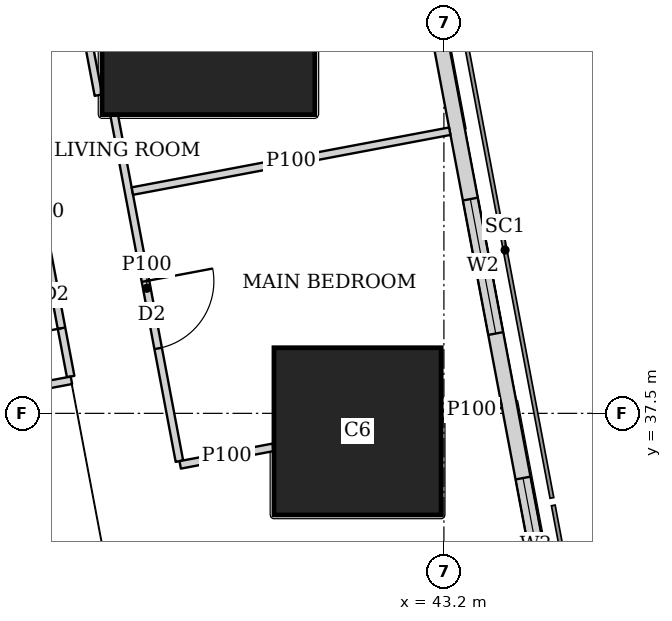
"""IFC4 building model, lengths in metres.
Left out: names, types, materials, properties, quantities, classifications, styles, units other than length and angle.
Written with IfcOpenShell. Run it as: python <this file> out.ifc"""

import sys

from ifc_helpers import new_model, si_unit, direction, frame, frame_2d, origin, origin_2d, place, context, subcontext, project, spatial, rectangle, extrude, element, fill, save


model = new_model("IFC4")
c1 = context("Model", 3, precision=1e-05, world=origin(), true_north=direction((0.0, 1.0)))
c2 = subcontext(c1, "Body", "Model", "MODEL_VIEW")
j1 = project(units=[si_unit("LENGTHUNIT", "METRE"), si_unit("PLANEANGLEUNIT", "RADIAN")], contexts=[c1])
p1 = place(None, origin())
s1 = spatial("IfcSite", under=j1, at=p1, CompositionType="ELEMENT")
p2 = place(p1, origin())
s2 = spatial("IfcBuilding", under=s1, at=p2, CompositionType="ELEMENT")
p3 = place(p2, frame((0.0, 0.0, 100.4)))
s3 = spatial("IfcBuildingStorey", under=s2, at=p3, CompositionType="ELEMENT", Elevation=100.4)
p4 = place(p3, frame((42.064, 37.263, 0.0), z_axis=(0.0, 0.0, 1.0), x_axis=(1.0, 0.0, 0.0)))
e1 = element("IfcColumn", 1, at=p4, inside=s3, PredefinedType="COLUMN", context=c2, shape_type="SweptSolid", body=[
    extrude(rectangle(XDim=2.2, YDim=2.2, at=origin_2d()), origin(), (0.0, 0.0, 1.0), 3.75),
])
p5 = place(p3, frame((40.102, 42.83, 0.0), z_axis=(0.0, 0.0, 1.0), x_axis=(1.0, 0.0, 0.0)))
e2 = element("IfcColumn", 2, at=p5, inside=s3, PredefinedType="COLUMN", context=c2, shape_type="SweptSolid", body=[
    extrude(rectangle(XDim=2.8, YDim=2.8, at=origin_2d()), origin(), (0.0, 0.0, 1.0), 3.75),
])
p6 = place(p3, frame((50.653, 2.703, 0.0), z_axis=(0.0, 0.0, 1.0), x_axis=(-0.185612026696, 0.982623109613, 0.0)))
e3 = element("IfcWall", 3, at=p6, inside=s3, PredefinedType="SOLIDWALL", context=c2, shape_type="SweptSolid", body=[
    extrude(rectangle(XDim=41.393, YDim=0.2, at=frame_2d((20.697, 0.0))), origin(), (0.0, 0.0, 1.0), 3.5),
])
p7 = place(p6, frame((1.633, 0.0, 0.9)))
e4 = element("IfcOpeningElement", 4, at=p7, cuts=e3, PredefinedType="OPENING", context=c2, shape_type="SweptSolid", body=[
    extrude(rectangle(XDim=1.8, YDim=1.5, at=frame_2d((0.9, 0.75))), frame((0.0, 0.11, 0.0), z_axis=(0.0, -1.0, 0.0), x_axis=(1.0, 0.0, 0.0)), (0.0, 0.0, 1.0), 0.22),
])
p8 = place(p6, frame((6.032, 0.0, 0.9)))
e5 = element("IfcOpeningElement", 5, at=p8, cuts=e3, PredefinedType="OPENING", context=c2, shape_type="SweptSolid", body=[
    extrude(rectangle(XDim=1.8, YDim=1.5, at=frame_2d((0.9, 0.75))), frame((0.0, 0.11, 0.0), z_axis=(0.0, -1.0, 0.0), x_axis=(1.0, 0.0, 0.0)), (0.0, 0.0, 1.0), 0.22),
])
p9 = place(p6, frame((9.848, 0.0, 0.9)))
e6 = element("IfcOpeningElement", 6, at=p9, cuts=e3, PredefinedType="OPENING", context=c2, shape_type="SweptSolid", body=[
    extrude(rectangle(XDim=1.8, YDim=1.5, at=frame_2d((0.9, 0.75))), frame((0.0, 0.11, 0.0), z_axis=(0.0, -1.0, 0.0), x_axis=(1.0, 0.0, 0.0)), (0.0, 0.0, 1.0), 0.22),
])
p10 = place(p6, frame((13.664, 0.0, 0.9)))
e7 = element("IfcOpeningElement", 7, at=p10, cuts=e3, PredefinedType="OPENING", context=c2, shape_type="SweptSolid", body=[
    extrude(rectangle(XDim=1.8, YDim=1.5, at=frame_2d((0.9, 0.75))), frame((0.0, 0.11, 0.0), z_axis=(0.0, -1.0, 0.0), x_axis=(1.0, 0.0, 0.0)), (0.0, 0.0, 1.0), 0.22),
])
p11 = place(p6, frame((17.481, 0.0, 0.9)))
e8 = element("IfcOpeningElement", 8, at=p11, cuts=e3, PredefinedType="OPENING", context=c2, shape_type="SweptSolid", body=[
    extrude(rectangle(XDim=1.8, YDim=1.5, at=frame_2d((0.9, 0.75))), frame((0.0, 0.11, 0.0), z_axis=(0.0, -1.0, 0.0), x_axis=(1.0, 0.0, 0.0)), (0.0, 0.0, 1.0), 0.22),
])
p12 = place(p6, frame((21.297, 0.0, 0.9)))
e9 = element("IfcOpeningElement", 9, at=p12, cuts=e3, PredefinedType="OPENING", context=c2, shape_type="SweptSolid", body=[
    extrude(rectangle(XDim=1.8, YDim=1.5, at=frame_2d((0.9, 0.75))), frame((0.0, 0.11, 0.0), z_axis=(0.0, -1.0, 0.0), x_axis=(1.0, 0.0, 0.0)), (0.0, 0.0, 1.0), 0.22),
])
p13 = place(p6, frame((25.113, 0.0, 0.9)))
e10 = element("IfcOpeningElement", 10, at=p13, cuts=e3, PredefinedType="OPENING", context=c2, shape_type="SweptSolid", body=[
    extrude(rectangle(XDim=1.8, YDim=1.5, at=frame_2d((0.9, 0.75))), frame((0.0, 0.11, 0.0), z_axis=(0.0, -1.0, 0.0), x_axis=(1.0, 0.0, 0.0)), (0.0, 0.0, 1.0), 0.22),
])
p14 = place(p6, frame((28.93, 0.0, 0.9)))
e11 = element("IfcOpeningElement", 11, at=p14, cuts=e3, PredefinedType="OPENING", context=c2, shape_type="SweptSolid", body=[
    extrude(rectangle(XDim=1.8, YDim=1.5, at=frame_2d((0.9, 0.75))), frame((0.0, 0.11, 0.0), z_axis=(0.0, -1.0, 0.0), x_axis=(1.0, 0.0, 0.0)), (0.0, 0.0, 1.0), 0.22),
])
p15 = place(p6, frame((32.746, 0.0, 0.9)))
e12 = element("IfcOpeningElement", 12, at=p15, cuts=e3, PredefinedType="OPENING", context=c2, shape_type="SweptSolid", body=[
    extrude(rectangle(XDim=1.8, YDim=1.5, at=frame_2d((0.9, 0.75))), frame((0.0, 0.11, 0.0), z_axis=(0.0, -1.0, 0.0), x_axis=(1.0, 0.0, 0.0)), (0.0, 0.0, 1.0), 0.22),
])
p16 = place(p6, frame((36.481, 0.0, 0.9)))
e13 = element("IfcOpeningElement", 13, at=p16, cuts=e3, PredefinedType="OPENING", context=c2, shape_type="SweptSolid", body=[
    extrude(rectangle(XDim=1.8, YDim=1.5, at=frame_2d((0.9, 0.75))), frame((0.0, 0.11, 0.0), z_axis=(0.0, -1.0, 0.0), x_axis=(1.0, 0.0, 0.0)), (0.0, 0.0, 1.0), 0.22),
])
p17 = place(p3, frame((33.382, 45.65, 0.0), z_axis=(0.0, 0.0, 1.0), x_axis=(0.185593544777, -0.982626600565, 0.0)))
e14 = element("IfcWall", 14, at=p17, inside=s3, PredefinedType="SOLIDWALL", context=c2, shape_type="SweptSolid", body=[
    extrude(rectangle(XDim=47.118, YDim=0.15, at=frame_2d((23.559, 0.0))), origin(), (0.0, 0.0, 1.0), 2.2),
])
p18 = place(p17, frame((10.662, 0.0, 0.0)))
e15 = element("IfcOpeningElement", 15, at=p18, cuts=e14, PredefinedType="OPENING", context=c2, shape_type="SweptSolid", body=[
    extrude(rectangle(XDim=1.0, YDim=2.1, at=frame_2d((0.5, 1.05))), frame((0.0, 0.085, 0.0), z_axis=(0.0, -1.0, 0.0), x_axis=(1.0, 0.0, 0.0)), (0.0, 0.0, 1.0), 0.17),
])
p19 = place(p17, frame((15.237, 0.0, 0.0)))
e16 = element("IfcOpeningElement", 16, at=p19, cuts=e14, PredefinedType="OPENING", context=c2, shape_type="SweptSolid", body=[
    extrude(rectangle(XDim=1.0, YDim=2.1, at=frame_2d((0.5, 1.05))), frame((0.0, 0.085, 0.0), z_axis=(0.0, -1.0, 0.0), x_axis=(1.0, 0.0, 0.0)), (0.0, 0.0, 1.0), 0.17),
])
p20 = place(p17, frame((27.341, 0.0, 0.0)))
e17 = element("IfcOpeningElement", 17, at=p20, cuts=e14, PredefinedType="OPENING", context=c2, shape_type="SweptSolid", body=[
    extrude(rectangle(XDim=1.0, YDim=2.1, at=frame_2d((0.5, 1.05))), frame((0.0, 0.085, 0.0), z_axis=(0.0, -1.0, 0.0), x_axis=(1.0, 0.0, 0.0)), (0.0, 0.0, 1.0), 0.17),
])
p21 = place(p17, frame((33.833, 0.0, 0.0)))
e18 = element("IfcOpeningElement", 18, at=p21, cuts=e14, PredefinedType="OPENING", context=c2, shape_type="SweptSolid", body=[
    extrude(rectangle(XDim=1.0, YDim=2.1, at=frame_2d((0.5, 1.05))), frame((0.0, 0.085, 0.0), z_axis=(0.0, -1.0, 0.0), x_axis=(1.0, 0.0, 0.0)), (0.0, 0.0, 1.0), 0.17),
])
p22 = place(p3, frame((38.654, 41.686, 0.0), z_axis=(0.0, 0.0, 1.0), x_axis=(-0.185676896978, 0.982610853761, 0.0)))
e19 = element("IfcWall", 19, at=p22, inside=s3, PredefinedType="PARTITIONING", context=c2, shape_type="SweptSolid", body=[
    extrude(rectangle(XDim=4.034, YDim=0.1, at=frame_2d((2.017, 0.0))), origin(), (0.0, 0.0, 1.0), 2.05),
])
p23 = place(p3, frame((38.862, 41.42, 0.0), z_axis=(0.0, 0.0, 1.0), x_axis=(0.185332907641, -0.982675792592, 0.0)))
e20 = element("IfcWall", 20, at=p23, inside=s3, PredefinedType="PARTITIONING", context=c2, shape_type="SweptSolid", body=[
    extrude(rectangle(XDim=4.629, YDim=0.1, at=frame_2d((2.314, 0.0))), origin(), (0.0, 0.0, 1.0), 3.5),
])
p24 = place(p23, frame((2.22, 0.0, 0.0)))
e21 = element("IfcOpeningElement", 21, at=p24, cuts=e20, PredefinedType="OPENING", context=c2, shape_type="SweptSolid", body=[
    extrude(rectangle(XDim=0.9, YDim=2.1, at=frame_2d((0.45, 1.05))), frame((0.0, 0.06, 0.0), z_axis=(0.0, -1.0, 0.0), x_axis=(1.0, 0.0, 0.0)), (0.0, 0.0, 1.0), 0.12),
])
p25 = place(p3, frame((37.472, 42.309, 0.0), z_axis=(0.0, 0.0, 1.0), x_axis=(0.185641287362, -0.982617581985, 0.0)))
e22 = element("IfcWall", 22, at=p25, inside=s3, PredefinedType="PARTITIONING", context=c2, shape_type="SweptSolid", body=[
    extrude(rectangle(XDim=4.402, YDim=0.1, at=frame_2d((2.201, 0.0))), origin(), (0.0, 0.0, 1.0), 3.5),
])
p26 = place(p25, frame((2.854, 0.0, 0.0)))
e23 = element("IfcOpeningElement", 23, at=p26, cuts=e22, PredefinedType="OPENING", context=c2, shape_type="SweptSolid", body=[
    extrude(rectangle(XDim=0.9, YDim=2.1, at=frame_2d((0.45, 1.05))), frame((0.0, 0.06, 0.0), z_axis=(0.0, -1.0, 0.0), x_axis=(1.0, 0.0, 0.0)), (0.0, 0.0, 1.0), 0.12),
])
p27 = place(p3, frame((43.277, 41.212, 0.0), z_axis=(0.0, 0.0, 1.0), x_axis=(-0.982665405803, -0.185387972203, 0.0)))
e24 = element("IfcWall", 24, at=p27, inside=s3, PredefinedType="PARTITIONING", context=c2, shape_type="SweptSolid", body=[
    extrude(rectangle(XDim=4.25, YDim=0.1, at=frame_2d((2.125, 0.0))), origin(), (0.0, 0.0, 1.0), 2.05),
])
p28 = place(p3, frame((43.955, 37.62, 0.0), z_axis=(0.0, 0.0, 1.0), x_axis=(-0.98247004097, -0.186420542316, 0.0)))
e25 = element("IfcWall", 25, at=p28, inside=s3, PredefinedType="PARTITIONING", context=c2, shape_type="SweptSolid", body=[
    extrude(rectangle(XDim=0.795, YDim=0.1, at=frame_2d((0.397, 0.0))), origin(), (0.0, 0.0, 1.0), 2.05),
])
p29 = place(p3, frame((40.954, 37.053, 0.0), z_axis=(0.0, 0.0, 1.0), x_axis=(-0.982663001154, -0.185400717808, 0.0)))
e26 = element("IfcWall", 26, at=p29, inside=s3, PredefinedType="PARTITIONING", context=c2, shape_type="SweptSolid", body=[
    extrude(rectangle(XDim=1.246, YDim=0.1, at=frame_2d((0.623, 0.0))), origin(), (0.0, 0.0, 1.0), 2.05),
])
p30 = place(p3, frame((38.299, 37.935, 0.0), z_axis=(0.0, 0.0, 1.0), x_axis=(-0.982536828695, -0.186068213993, 0.0)))
e27 = element("IfcWall", 27, at=p30, inside=s3, PredefinedType="PARTITIONING", context=c2, shape_type="SweptSolid", body=[
    extrude(rectangle(XDim=1.515, YDim=0.1, at=frame_2d((0.758, 0.0))), origin(), (0.0, 0.0, 1.0), 3.5),
])
p31 = place(p15, origin())
e28 = element("IfcWindow", 28, at=p31, inside=s3, PartitioningType="SINGLE_PANEL", PredefinedType="WINDOW", context=c2, shape_type="SweptSolid", body=[
    extrude(rectangle(XDim=1.8, YDim=1.5, at=frame_2d((0.9, 0.75))), frame((0.0, 0.03, 0.0), z_axis=(0.0, -1.0, 0.0), x_axis=(1.0, 0.0, 0.0)), (0.0, 0.0, 1.0), 0.06),
])
fill(e12, e28)
p32 = place(p16, origin())
e29 = element("IfcWindow", 29, at=p32, inside=s3, PartitioningType="SINGLE_PANEL", PredefinedType="WINDOW", context=c2, shape_type="SweptSolid", body=[
    extrude(rectangle(XDim=1.8, YDim=1.5, at=frame_2d((0.9, 0.75))), frame((0.0, 0.03, 0.0), z_axis=(0.0, -1.0, 0.0), x_axis=(1.0, 0.0, 0.0)), (0.0, 0.0, 1.0), 0.06),
])
fill(e13, e29)
p33 = place(p24, origin())
e30 = element("IfcDoor", 30, at=p33, inside=s3, OperationType="SINGLE_SWING_LEFT", PredefinedType="DOOR", context=c2, shape_type="SweptSolid", body=[
    extrude(rectangle(XDim=0.9, YDim=2.1, at=frame_2d((0.45, 1.05))), frame((0.0, 0.025, 0.0), z_axis=(0.0, -1.0, 0.0), x_axis=(1.0, 0.0, 0.0)), (0.0, 0.0, 1.0), 0.05),
])
fill(e21, e30)
p34 = place(p26, origin())
e31 = element("IfcDoor", 31, at=p34, inside=s3, OperationType="SINGLE_SWING_LEFT", PredefinedType="DOOR", context=c2, shape_type="SweptSolid", body=[
    extrude(rectangle(XDim=0.9, YDim=2.1, at=frame_2d((0.45, 1.05))), frame((0.0, 0.025, 0.0), z_axis=(0.0, -1.0, 0.0), x_axis=(1.0, 0.0, 0.0)), (0.0, 0.0, 1.0), 0.05),
])
fill(e23, e31)
save(model, sys.argv[1])
